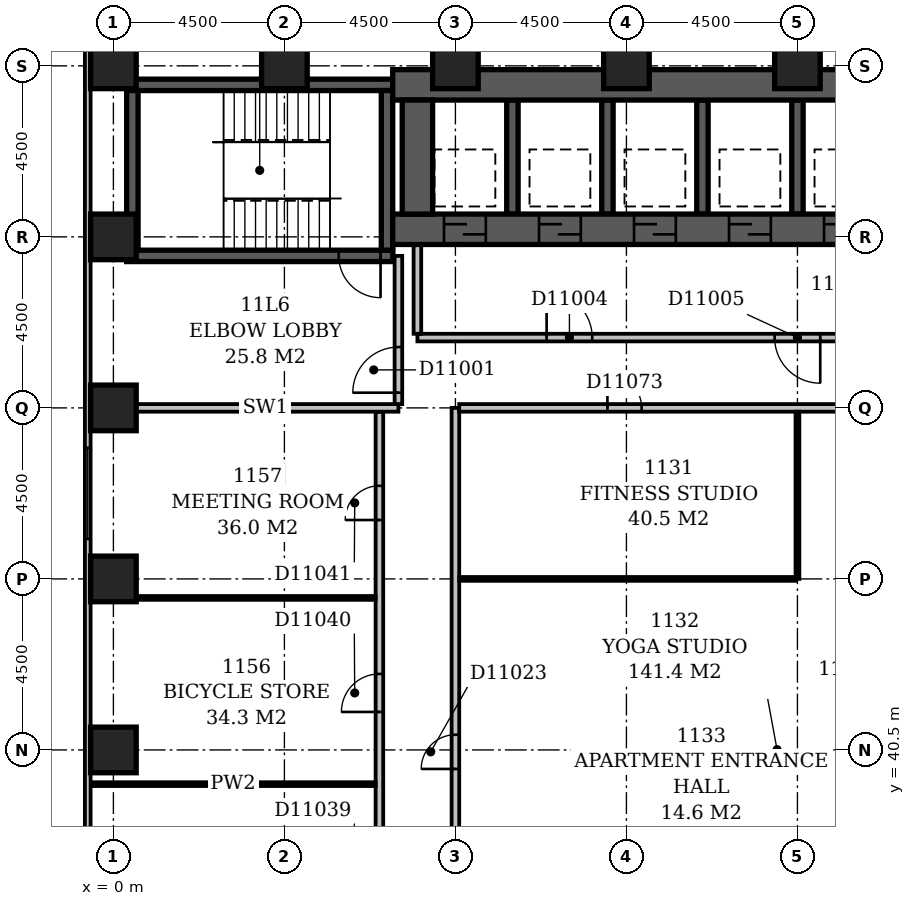
"""IFC4 building model, lengths in metres.
Left out: names, types, materials, properties, quantities, classifications, styles, units other than length and angle.
Written with IfcOpenShell. Run it as: python <this file> out.ifc"""

import sys

from ifc_helpers import new_model, si_unit, direction, frame, frame_2d, origin, origin_2d, place, context, subcontext, project, spatial, rectangle, extrude, element, fill, save


model = new_model("IFC4")
c1 = context("Model", 3, precision=1e-05, world=origin(), true_north=direction((0.0, 1.0)))
c2 = subcontext(c1, "Body", "Model", "MODEL_VIEW")
j1 = project(units=[si_unit("LENGTHUNIT", "METRE"), si_unit("PLANEANGLEUNIT", "RADIAN")], contexts=[c1])
p1 = place(None, origin())
s1 = spatial("IfcSite", under=j1, at=p1, CompositionType="ELEMENT")
p2 = place(p1, origin())
s2 = spatial("IfcBuilding", under=s1, at=p2, CompositionType="ELEMENT")
p3 = place(p2, frame((0.0, 0.0, 50.6)))
s3 = spatial("IfcBuildingStorey", under=s2, at=p3, CompositionType="ELEMENT", Elevation=50.6)
p4 = place(p3, frame((0.35, 53.5, -0.3), z_axis=(0.0, 0.0, 1.0), x_axis=(1.0, 0.0, 0.0)))
e1 = element("IfcWall", 1, at=p4, inside=s3, PredefinedType="SHEAR", context=c2, shape_type="SweptSolid", body=[
    extrude(rectangle(XDim=7.0, YDim=0.3, at=frame_2d((3.5, 0.0))), origin(), (0.0, 0.0, 1.0), 3.6),
])
p5 = place(p4, frame((5.58, 0.0, 0.3)))
e2 = element("IfcOpeningElement", 2, at=p5, cuts=e1, PredefinedType="OPENING", context=c2, shape_type="SweptSolid", body=[
    extrude(rectangle(XDim=1.1, YDim=2.1, at=frame_2d((0.55, 1.05))), frame((0.0, 0.162, 0.0), z_axis=(0.0, -1.0, 0.0), x_axis=(1.0, 0.0, 0.0)), (0.0, 0.0, 1.0), 0.324),
])
p6 = place(p3, frame((0.35, 58.0, -0.3), z_axis=(0.0, 0.0, 1.0), x_axis=(1.0, 0.0, 0.0)))
e3 = element("IfcWall", 3, at=p6, inside=s3, PredefinedType="SHEAR", context=c2, shape_type="SweptSolid", body=[
    extrude(rectangle(XDim=7.0, YDim=0.3, at=frame_2d((3.5, 0.0))), origin(), (0.0, 0.0, 1.0), 3.6),
])
for number, where, z_axis, x_axis in (
    (4, (0.5, 53.65, -0.3), (0.0, 0.0, 1.0), (0.0, 1.0, 0.0)),
    (5, (7.2, 53.65, -0.3), (0.0, 0.0, 1.0), (0.0, 1.0, 0.0)),
):
    element("IfcWall", number, at=place(p3, frame(where, z_axis=z_axis, x_axis=x_axis)), inside=s3, PredefinedType="SHEAR", context=c2, shape_type="SweptSolid", body=[
        extrude(rectangle(XDim=4.2, YDim=0.3, at=frame_2d((2.1, 0.0))), origin(), (0.0, 0.0, 1.0), 3.6),
    ])
p7 = place(p3, frame((7.35, 54.2, -0.3), z_axis=(0.0, 0.0, 1.0), x_axis=(1.0, 0.0, 0.0)))
e6 = element("IfcWall", 6, at=p7, inside=s3, PredefinedType="SHEAR", context=c2, shape_type="SweptSolid", body=[
    extrude(rectangle(XDim=16.45, YDim=0.8, at=frame_2d((8.225, 0.0))), origin(), (0.0, 0.0, 1.0), 3.6),
])
p8 = place(p7, frame((1.35, 0.0, 0.3)))
e7 = element("IfcOpeningElement", 7, at=p8, cuts=e6, PredefinedType="OPENING", context=c2, shape_type="SweptSolid", body=[
    extrude(rectangle(XDim=1.1, YDim=2.1, at=frame_2d((0.55, 1.05))), frame((0.0, 0.412, 0.0), z_axis=(0.0, -1.0, 0.0), x_axis=(1.0, 0.0, 0.0)), (0.0, 0.0, 1.0), 0.824),
])
p9 = place(p7, frame((3.85, 0.0, 0.3)))
e8 = element("IfcOpeningElement", 8, at=p9, cuts=e6, PredefinedType="OPENING", context=c2, shape_type="SweptSolid", body=[
    extrude(rectangle(XDim=1.1, YDim=2.1, at=frame_2d((0.55, 1.05))), frame((0.0, 0.412, 0.0), z_axis=(0.0, -1.0, 0.0), x_axis=(1.0, 0.0, 0.0)), (0.0, 0.0, 1.0), 0.824),
])
p10 = place(p7, frame((6.35, 0.0, 0.3)))
e9 = element("IfcOpeningElement", 9, at=p10, cuts=e6, PredefinedType="OPENING", context=c2, shape_type="SweptSolid", body=[
    extrude(rectangle(XDim=1.1, YDim=2.1, at=frame_2d((0.55, 1.05))), frame((0.0, 0.412, 0.0), z_axis=(0.0, -1.0, 0.0), x_axis=(1.0, 0.0, 0.0)), (0.0, 0.0, 1.0), 0.824),
])
p11 = place(p7, frame((8.85, 0.0, 0.3)))
e10 = element("IfcOpeningElement", 10, at=p11, cuts=e6, PredefinedType="OPENING", context=c2, shape_type="SweptSolid", body=[
    extrude(rectangle(XDim=1.1, YDim=2.1, at=frame_2d((0.55, 1.05))), frame((0.0, 0.412, 0.0), z_axis=(0.0, -1.0, 0.0), x_axis=(1.0, 0.0, 0.0)), (0.0, 0.0, 1.0), 0.824),
])
p12 = place(p7, frame((11.35, 0.0, 0.3)))
e11 = element("IfcOpeningElement", 11, at=p12, cuts=e6, PredefinedType="OPENING", context=c2, shape_type="SweptSolid", body=[
    extrude(rectangle(XDim=1.1, YDim=2.1, at=frame_2d((0.55, 1.05))), frame((0.0, 0.412, 0.0), z_axis=(0.0, -1.0, 0.0), x_axis=(1.0, 0.0, 0.0)), (0.0, 0.0, 1.0), 0.824),
])
p13 = place(p7, frame((13.85, 0.0, 0.3)))
e12 = element("IfcOpeningElement", 12, at=p13, cuts=e6, PredefinedType="OPENING", context=c2, shape_type="SweptSolid", body=[
    extrude(rectangle(XDim=1.1, YDim=2.1, at=frame_2d((0.55, 1.05))), frame((0.0, 0.412, 0.0), z_axis=(0.0, -1.0, 0.0), x_axis=(1.0, 0.0, 0.0)), (0.0, 0.0, 1.0), 0.824),
])
p14 = place(p3, frame((7.35, 58.0, -0.3), z_axis=(0.0, 0.0, 1.0), x_axis=(1.0, 0.0, 0.0)))
e13 = element("IfcWall", 13, at=p14, inside=s3, PredefinedType="SHEAR", context=c2, shape_type="SweptSolid", body=[
    extrude(rectangle(XDim=16.45, YDim=0.8, at=frame_2d((8.225, 0.0))), origin(), (0.0, 0.0, 1.0), 3.6),
])
p15 = place(p3, frame((8.0, 54.6, -0.3), z_axis=(0.0, 0.0, 1.0), x_axis=(0.0, 1.0, 0.0)))
e14 = element("IfcWall", 14, at=p15, inside=s3, PredefinedType="SHEAR", context=c2, shape_type="SweptSolid", body=[
    extrude(rectangle(XDim=3.0, YDim=0.8, at=frame_2d((1.5, 0.0))), origin(), (0.0, 0.0, 1.0), 3.6),
])
for number, where, z_axis, x_axis in (
    (15, (10.5, 54.6, -0.3), (0.0, 0.0, 1.0), (0.0, 1.0, 0.0)),
    (16, (13.0, 54.6, -0.3), (0.0, 0.0, 1.0), (0.0, 1.0, 0.0)),
    (17, (15.5, 54.6, -0.3), (0.0, 0.0, 1.0), (0.0, 1.0, 0.0)),
    (18, (18.0, 54.6, -0.3), (0.0, 0.0, 1.0), (0.0, 1.0, 0.0)),
):
    element("IfcWall", number, at=place(p3, frame(where, z_axis=z_axis, x_axis=x_axis)), inside=s3, PredefinedType="SHEAR", context=c2, shape_type="SweptSolid", body=[
        extrude(rectangle(XDim=3.0, YDim=0.3, at=frame_2d((1.5, 0.0))), origin(), (0.0, 0.0, 1.0), 3.6),
    ])
for number, where, z_axis, x_axis in (
    (19, (0.0, 40.5, -0.3), (0.0, 0.0, 1.0), (1.0, 0.0, 0.0)),
    (20, (0.0, 45.0, -0.3), (0.0, 0.0, 1.0), (1.0, 0.0, 0.0)),
    (21, (0.0, 49.5, -0.3), (0.0, 0.0, 1.0), (1.0, 0.0, 0.0)),
    (22, (0.0, 54.0, -0.3), (0.0, 0.0, 1.0), (1.0, 0.0, 0.0)),
    (23, (0.0, 58.5, -0.3), (0.0, 0.0, 1.0), (1.0, 0.0, 0.0)),
    (24, (4.5, 58.5, -0.3), (0.0, 0.0, 1.0), (1.0, 0.0, 0.0)),
    (25, (9.0, 58.5, -0.3), (0.0, 0.0, 1.0), (1.0, 0.0, 0.0)),
    (26, (13.5, 58.5, -0.3), (0.0, 0.0, 1.0), (1.0, 0.0, 0.0)),
    (27, (18.0, 58.5, -0.3), (0.0, 0.0, 1.0), (1.0, 0.0, 0.0)),
):
    element("IfcColumn", number, at=place(p3, frame(where, z_axis=z_axis, x_axis=x_axis)), inside=s3, PredefinedType="COLUMN", context=c2, shape_type="SweptSolid", body=[
        extrude(rectangle(XDim=1.2, YDim=1.2, at=origin_2d()), origin(), (0.0, 0.0, 1.0), 3.6),
    ])
p16 = place(p3, frame((-0.675, 59.1, 0.0), z_axis=(0.0, 0.0, 1.0), x_axis=(0.0, -1.0, 0.0)))
e28 = element("IfcWall", 28, at=p16, inside=s3, PredefinedType="STANDARD", context=c2, shape_type="SweptSolid", body=[
    extrude(rectangle(XDim=55.35, YDim=0.15, at=frame_2d((27.675, 0.0))), origin(), (0.0, 0.0, 1.0), 2.7),
])
p17 = place(p16, frame((10.65, 0.0, 0.6)))
e29 = element("IfcOpeningElement", 29, at=p17, cuts=e28, PredefinedType="OPENING", context=c2, shape_type="SweptSolid", body=[
    extrude(rectangle(XDim=2.4, YDim=1.8, at=frame_2d((1.2, 0.9))), frame((0.0, 0.087, 0.0), z_axis=(0.0, -1.0, 0.0), x_axis=(1.0, 0.0, 0.0)), (0.0, 0.0, 1.0), 0.174),
])
p18 = place(p16, frame((42.15, 0.0, 0.6)))
e30 = element("IfcOpeningElement", 30, at=p18, cuts=e28, PredefinedType="OPENING", context=c2, shape_type="SweptSolid", body=[
    extrude(rectangle(XDim=2.4, YDim=1.8, at=frame_2d((1.2, 0.9))), frame((0.0, 0.087, 0.0), z_axis=(0.0, -1.0, 0.0), x_axis=(1.0, 0.0, 0.0)), (0.0, 0.0, 1.0), 0.174),
])
p19 = place(p3, frame((8.0, 51.35, 0.0), z_axis=(0.0, 0.0, 1.0), x_axis=(1.0, 0.0, 0.0)))
e31 = element("IfcWall", 31, at=p19, inside=s3, PredefinedType="PARTITIONING", context=c2, shape_type="SweptSolid", body=[
    extrude(rectangle(XDim=15.0, YDim=0.2, at=frame_2d((7.5, 0.0))), origin(), (0.0, 0.0, 1.0), 3.3),
])
p20 = place(p19, frame((3.4, 0.0, 0.0)))
e32 = element("IfcOpeningElement", 32, at=p20, cuts=e31, PredefinedType="OPENING", context=c2, shape_type="SweptSolid", body=[
    extrude(rectangle(XDim=1.2, YDim=2.1, at=frame_2d((0.6, 1.05))), frame((0.0, 0.112, 0.0), z_axis=(0.0, -1.0, 0.0), x_axis=(1.0, 0.0, 0.0)), (0.0, 0.0, 1.0), 0.224),
])
p21 = place(p19, frame((9.4, 0.0, 0.0)))
e33 = element("IfcOpeningElement", 33, at=p21, cuts=e31, PredefinedType="OPENING", context=c2, shape_type="SweptSolid", body=[
    extrude(rectangle(XDim=1.2, YDim=2.1, at=frame_2d((0.6, 1.05))), frame((0.0, 0.112, 0.0), z_axis=(0.0, -1.0, 0.0), x_axis=(1.0, 0.0, 0.0)), (0.0, 0.0, 1.0), 0.224),
])
p22 = place(p3, frame((8.0, 51.45, 0.0), z_axis=(0.0, 0.0, 1.0), x_axis=(0.0, 1.0, 0.0)))
e34 = element("IfcWall", 34, at=p22, inside=s3, PredefinedType="PARTITIONING", context=c2, shape_type="SweptSolid", body=[
    extrude(rectangle(XDim=2.33, YDim=0.2, at=frame_2d((1.165, 0.0))), origin(), (0.0, 0.0, 1.0), 3.3),
])
p23 = place(p3, frame((0.5, 49.5, 0.0), z_axis=(0.0, 0.0, 1.0), x_axis=(1.0, 0.0, 0.0)))
e35 = element("IfcWall", 35, at=p23, inside=s3, PredefinedType="PARTITIONING", context=c2, shape_type="SweptSolid", body=[
    extrude(rectangle(XDim=7.0, YDim=0.2, at=frame_2d((3.5, 0.0))), origin(), (0.0, 0.0, 1.0), 3.3),
])
p24 = place(p3, frame((7.5, 49.6, 0.0), z_axis=(0.0, 0.0, 1.0), x_axis=(0.0, 1.0, 0.0)))
e36 = element("IfcWall", 36, at=p24, inside=s3, PredefinedType="PARTITIONING", context=c2, shape_type="SweptSolid", body=[
    extrude(rectangle(XDim=3.9, YDim=0.2, at=frame_2d((1.95, 0.0))), origin(), (0.0, 0.0, 1.0), 3.3),
])
p25 = place(p24, frame((0.3, 0.0, 0.0)))
e37 = element("IfcOpeningElement", 37, at=p25, cuts=e36, PredefinedType="OPENING", context=c2, shape_type="SweptSolid", body=[
    extrude(rectangle(XDim=1.2, YDim=2.1, at=frame_2d((0.6, 1.05))), frame((0.0, 0.112, 0.0), z_axis=(0.0, -1.0, 0.0), x_axis=(1.0, 0.0, 0.0)), (0.0, 0.0, 1.0), 0.224),
])
p26 = place(p3, frame((9.0, 5.0, 0.0), z_axis=(0.0, 0.0, 1.0), x_axis=(0.0, 1.0, 0.0)))
e38 = element("IfcWall", 38, at=p26, inside=s3, PredefinedType="PARTITIONING", context=c2, shape_type="SweptSolid", body=[
    extrude(rectangle(XDim=44.5, YDim=0.2, at=frame_2d((22.25, 0.0))), origin(), (0.0, 0.0, 1.0), 3.3),
])
p27 = place(p26, frame((28.45, 0.0, 0.0)))
e39 = element("IfcOpeningElement", 39, at=p27, cuts=e38, PredefinedType="OPENING", context=c2, shape_type="SweptSolid", body=[
    extrude(rectangle(XDim=1.0, YDim=2.1, at=frame_2d((0.5, 1.05))), frame((0.0, 0.112, 0.0), z_axis=(0.0, -1.0, 0.0), x_axis=(1.0, 0.0, 0.0)), (0.0, 0.0, 1.0), 0.224),
])
p28 = place(p26, frame((17.8, 0.0, 0.0)))
e40 = element("IfcOpeningElement", 40, at=p28, cuts=e38, PredefinedType="OPENING", context=c2, shape_type="SweptSolid", body=[
    extrude(rectangle(XDim=1.0, YDim=2.1, at=frame_2d((0.5, 1.05))), frame((0.0, 0.112, 0.0), z_axis=(0.0, -1.0, 0.0), x_axis=(1.0, 0.0, 0.0)), (0.0, 0.0, 1.0), 0.224),
])
p29 = place(p26, frame((14.55, 0.0, 0.0)))
e41 = element("IfcOpeningElement", 41, at=p29, cuts=e38, PredefinedType="OPENING", context=c2, shape_type="SweptSolid", body=[
    extrude(rectangle(XDim=1.0, YDim=2.1, at=frame_2d((0.5, 1.05))), frame((0.0, 0.112, 0.0), z_axis=(0.0, -1.0, 0.0), x_axis=(1.0, 0.0, 0.0)), (0.0, 0.0, 1.0), 0.224),
])
p30 = place(p26, frame((11.7, 0.0, 0.0)))
e42 = element("IfcOpeningElement", 42, at=p30, cuts=e38, PredefinedType="OPENING", context=c2, shape_type="SweptSolid", body=[
    extrude(rectangle(XDim=1.0, YDim=2.1, at=frame_2d((0.5, 1.05))), frame((0.0, 0.112, 0.0), z_axis=(0.0, -1.0, 0.0), x_axis=(1.0, 0.0, 0.0)), (0.0, 0.0, 1.0), 0.224),
])
p31 = place(p26, frame((35.0, 0.0, 0.0)))
e43 = element("IfcOpeningElement", 43, at=p31, cuts=e38, PredefinedType="OPENING", context=c2, shape_type="SweptSolid", body=[
    extrude(rectangle(XDim=0.9, YDim=2.1, at=frame_2d((0.45, 1.05))), frame((0.0, 0.112, 0.0), z_axis=(0.0, -1.0, 0.0), x_axis=(1.0, 0.0, 0.0)), (0.0, 0.0, 1.0), 0.224),
])
p32 = place(p26, frame((1.5, 0.0, 0.0)))
e44 = element("IfcOpeningElement", 44, at=p32, cuts=e38, PredefinedType="OPENING", context=c2, shape_type="SweptSolid", body=[
    extrude(rectangle(XDim=0.9, YDim=2.1, at=frame_2d((0.45, 1.05))), frame((0.0, 0.112, 0.0), z_axis=(0.0, -1.0, 0.0), x_axis=(1.0, 0.0, 0.0)), (0.0, 0.0, 1.0), 0.224),
])
p33 = place(p3, frame((7.0, 34.6, 0.0), z_axis=(0.0, 0.0, 1.0), x_axis=(0.0, 1.0, 0.0)))
e45 = element("IfcWall", 45, at=p33, inside=s3, PredefinedType="PARTITIONING", context=c2, shape_type="SweptSolid", body=[
    extrude(rectangle(XDim=14.8, YDim=0.2, at=frame_2d((7.4, 0.0))), origin(), (0.0, 0.0, 1.0), 3.3),
])
p34 = place(p33, frame((1.9, 0.0, 0.0)))
e46 = element("IfcOpeningElement", 46, at=p34, cuts=e45, PredefinedType="OPENING", context=c2, shape_type="SweptSolid", body=[
    extrude(rectangle(XDim=1.0, YDim=2.1, at=frame_2d((0.5, 1.05))), frame((0.0, 0.112, 0.0), z_axis=(0.0, -1.0, 0.0), x_axis=(1.0, 0.0, 0.0)), (0.0, 0.0, 1.0), 0.224),
])
p35 = place(p33, frame((6.9, 0.0, 0.0)))
e47 = element("IfcOpeningElement", 47, at=p35, cuts=e45, PredefinedType="OPENING", context=c2, shape_type="SweptSolid", body=[
    extrude(rectangle(XDim=1.0, YDim=2.1, at=frame_2d((0.5, 1.05))), frame((0.0, 0.112, 0.0), z_axis=(0.0, -1.0, 0.0), x_axis=(1.0, 0.0, 0.0)), (0.0, 0.0, 1.0), 0.224),
])
p36 = place(p33, frame((11.95, 0.0, 0.0)))
e48 = element("IfcOpeningElement", 48, at=p36, cuts=e45, PredefinedType="OPENING", context=c2, shape_type="SweptSolid", body=[
    extrude(rectangle(XDim=0.9, YDim=2.1, at=frame_2d((0.45, 1.05))), frame((0.0, 0.112, 0.0), z_axis=(0.0, -1.0, 0.0), x_axis=(1.0, 0.0, 0.0)), (0.0, 0.0, 1.0), 0.224),
])
p37 = place(p3, frame((-0.6, 39.6, 0.0), z_axis=(0.0, 0.0, 1.0), x_axis=(1.0, 0.0, 0.0)))
e49 = element("IfcWall", 49, at=p37, inside=s3, PredefinedType="PARTITIONING", context=c2, shape_type="SweptSolid", body=[
    extrude(rectangle(XDim=7.5, YDim=0.1, at=frame_2d((3.75, 0.0))), origin(), (0.0, 0.0, 1.0), 3.3),
])
p38 = place(p3, frame((0.6, 44.5, 0.0), z_axis=(0.0, 0.0, 1.0), x_axis=(1.0, 0.0, 0.0)))
e50 = element("IfcWall", 50, at=p38, inside=s3, PredefinedType="PARTITIONING", context=c2, shape_type="SweptSolid", body=[
    extrude(rectangle(XDim=6.3, YDim=0.1, at=frame_2d((3.15, 0.0))), origin(), (0.0, 0.0, 1.0), 3.3),
])
p39 = place(p3, frame((9.1, 45.0, 0.0), z_axis=(0.0, 0.0, 1.0), x_axis=(1.0, 0.0, 0.0)))
e51 = element("IfcWall", 51, at=p39, inside=s3, PredefinedType="PARTITIONING", context=c2, shape_type="SweptSolid", body=[
    extrude(rectangle(XDim=8.85, YDim=0.1, at=frame_2d((4.425, 0.0))), origin(), (0.0, 0.0, 1.0), 3.3),
])
p40 = place(p3, frame((18.0, 45.0, 0.0), z_axis=(0.0, 0.0, 1.0), x_axis=(0.0, 1.0, 0.0)))
e52 = element("IfcWall", 52, at=p40, inside=s3, PredefinedType="PARTITIONING", context=c2, shape_type="SweptSolid", body=[
    extrude(rectangle(XDim=4.4, YDim=0.1, at=frame_2d((2.2, 0.0))), origin(), (0.0, 0.0, 1.0), 3.3),
])
p41 = place(p3, frame((9.1, 49.5, 0.0), z_axis=(0.0, 0.0, 1.0), x_axis=(1.0, 0.0, 0.0)))
e53 = element("IfcWall", 53, at=p41, inside=s3, PredefinedType="PARTITIONING", context=c2, shape_type="SweptSolid", body=[
    extrude(rectangle(XDim=57.8, YDim=0.2, at=frame_2d((28.9, 0.0))), origin(), (0.0, 0.0, 1.0), 3.3),
])
p42 = place(p41, frame((16.1, 0.0, 0.0)))
e54 = element("IfcOpeningElement", 54, at=p42, cuts=e53, PredefinedType="OPENING", context=c2, shape_type="SweptSolid", body=[
    extrude(rectangle(XDim=1.0, YDim=2.1, at=frame_2d((0.5, 1.05))), frame((0.0, 0.112, 0.0), z_axis=(0.0, -1.0, 0.0), x_axis=(1.0, 0.0, 0.0)), (0.0, 0.0, 1.0), 0.224),
])
p43 = place(p41, frame((40.0, 0.0, 0.0)))
e55 = element("IfcOpeningElement", 55, at=p43, cuts=e53, PredefinedType="OPENING", context=c2, shape_type="SweptSolid", body=[
    extrude(rectangle(XDim=1.0, YDim=2.1, at=frame_2d((0.5, 1.05))), frame((0.0, 0.112, 0.0), z_axis=(0.0, -1.0, 0.0), x_axis=(1.0, 0.0, 0.0)), (0.0, 0.0, 1.0), 0.224),
])
p44 = place(p41, frame((45.2, 0.0, 0.0)))
e56 = element("IfcOpeningElement", 56, at=p44, cuts=e53, PredefinedType="OPENING", context=c2, shape_type="SweptSolid", body=[
    extrude(rectangle(XDim=1.0, YDim=2.1, at=frame_2d((0.5, 1.05))), frame((0.0, 0.112, 0.0), z_axis=(0.0, -1.0, 0.0), x_axis=(1.0, 0.0, 0.0)), (0.0, 0.0, 1.0), 0.224),
])
p45 = place(p41, frame((3.9, 0.0, 0.0)))
e57 = element("IfcOpeningElement", 57, at=p45, cuts=e53, PredefinedType="OPENING", context=c2, shape_type="SweptSolid", body=[
    extrude(rectangle(XDim=0.9, YDim=2.1, at=frame_2d((0.45, 1.05))), frame((0.0, 0.112, 0.0), z_axis=(0.0, -1.0, 0.0), x_axis=(1.0, 0.0, 0.0)), (0.0, 0.0, 1.0), 0.224),
])
p46 = place(p17, origin())
e58 = element("IfcWindow", 58, at=p46, inside=s3, PartitioningType="SINGLE_PANEL", PredefinedType="WINDOW", context=c2, shape_type="SweptSolid", body=[
    extrude(rectangle(XDim=2.4, YDim=1.8, at=frame_2d((1.2, 0.9))), frame((0.0, 0.03, 0.0), z_axis=(0.0, -1.0, 0.0), x_axis=(1.0, 0.0, 0.0)), (0.0, 0.0, 1.0), 0.06),
])
fill(e29, e58)
p47 = place(p25, origin())
e59 = element("IfcDoor", 59, at=p47, inside=s3, OperationType="SINGLE_SWING_LEFT", PredefinedType="DOOR", context=c2, shape_type="SweptSolid", body=[
    extrude(rectangle(XDim=1.2, YDim=2.1, at=frame_2d((0.6, 1.05))), frame((0.0, 0.025, 0.0), z_axis=(0.0, -1.0, 0.0), x_axis=(1.0, 0.0, 0.0)), (0.0, 0.0, 1.0), 0.05),
])
fill(e37, e59)
p48 = place(p8, origin())
e60 = element("IfcDoor", 60, at=p48, inside=s3, OperationType="SLIDING_TO_LEFT", PredefinedType="DOOR", context=c2, shape_type="SweptSolid", body=[
    extrude(rectangle(XDim=1.1, YDim=2.1, at=frame_2d((0.55, 1.05))), frame((0.0, 0.025, 0.0), z_axis=(0.0, -1.0, 0.0), x_axis=(1.0, 0.0, 0.0)), (0.0, 0.0, 1.0), 0.05),
])
fill(e7, e60)
p49 = place(p9, origin())
e61 = element("IfcDoor", 61, at=p49, inside=s3, OperationType="SLIDING_TO_LEFT", PredefinedType="DOOR", context=c2, shape_type="SweptSolid", body=[
    extrude(rectangle(XDim=1.1, YDim=2.1, at=frame_2d((0.55, 1.05))), frame((0.0, 0.025, 0.0), z_axis=(0.0, -1.0, 0.0), x_axis=(1.0, 0.0, 0.0)), (0.0, 0.0, 1.0), 0.05),
])
fill(e8, e61)
p50 = place(p10, origin())
e62 = element("IfcDoor", 62, at=p50, inside=s3, OperationType="SLIDING_TO_LEFT", PredefinedType="DOOR", context=c2, shape_type="SweptSolid", body=[
    extrude(rectangle(XDim=1.1, YDim=2.1, at=frame_2d((0.55, 1.05))), frame((0.0, 0.025, 0.0), z_axis=(0.0, -1.0, 0.0), x_axis=(1.0, 0.0, 0.0)), (0.0, 0.0, 1.0), 0.05),
])
fill(e9, e62)
p51 = place(p11, origin())
e63 = element("IfcDoor", 63, at=p51, inside=s3, OperationType="SLIDING_TO_LEFT", PredefinedType="DOOR", context=c2, shape_type="SweptSolid", body=[
    extrude(rectangle(XDim=1.1, YDim=2.1, at=frame_2d((0.55, 1.05))), frame((0.0, 0.025, 0.0), z_axis=(0.0, -1.0, 0.0), x_axis=(1.0, 0.0, 0.0)), (0.0, 0.0, 1.0), 0.05),
])
fill(e10, e63)
p52 = place(p12, origin())
e64 = element("IfcDoor", 64, at=p52, inside=s3, OperationType="SLIDING_TO_LEFT", PredefinedType="DOOR", context=c2, shape_type="SweptSolid", body=[
    extrude(rectangle(XDim=1.1, YDim=2.1, at=frame_2d((0.55, 1.05))), frame((0.0, 0.025, 0.0), z_axis=(0.0, -1.0, 0.0), x_axis=(1.0, 0.0, 0.0)), (0.0, 0.0, 1.0), 0.05),
])
fill(e11, e64)
p53 = place(p20, origin())
e65 = element("IfcDoor", 65, at=p53, inside=s3, OperationType="SINGLE_SWING_LEFT", PredefinedType="DOOR", context=c2, shape_type="SweptSolid", body=[
    extrude(rectangle(XDim=1.2, YDim=2.1, at=frame_2d((0.6, 1.05))), frame((0.0, 0.025, 0.0), z_axis=(0.0, -1.0, 0.0), x_axis=(1.0, 0.0, 0.0)), (0.0, 0.0, 1.0), 0.05),
])
fill(e32, e65)
p54 = place(p21, origin())
e66 = element("IfcDoor", 66, at=p54, inside=s3, OperationType="SINGLE_SWING_RIGHT", PredefinedType="DOOR", context=c2, shape_type="SweptSolid", body=[
    extrude(rectangle(XDim=1.2, YDim=2.1, at=frame_2d((0.6, 1.05))), frame((0.0, 0.025, 0.0), z_axis=(0.0, -1.0, 0.0), x_axis=(1.0, 0.0, 0.0)), (0.0, 0.0, 1.0), 0.05),
])
fill(e33, e66)
p55 = place(p5, origin())
e67 = element("IfcDoor", 67, at=p55, inside=s3, OperationType="SINGLE_SWING_RIGHT", PredefinedType="DOOR", context=c2, shape_type="SweptSolid", body=[
    extrude(rectangle(XDim=1.1, YDim=2.1, at=frame_2d((0.55, 1.05))), frame((0.0, 0.025, 0.0), z_axis=(0.0, -1.0, 0.0), x_axis=(1.0, 0.0, 0.0)), (0.0, 0.0, 1.0), 0.05),
])
fill(e2, e67)
p56 = place(p31, origin())
e68 = element("IfcDoor", 68, at=p56, inside=s3, OperationType="SINGLE_SWING_LEFT", PredefinedType="DOOR", context=c2, shape_type="SweptSolid", body=[
    extrude(rectangle(XDim=0.9, YDim=2.1, at=frame_2d((0.45, 1.05))), frame((0.0, 0.025, 0.0), z_axis=(0.0, -1.0, 0.0), x_axis=(1.0, 0.0, 0.0)), (0.0, 0.0, 1.0), 0.05),
])
fill(e43, e68)
p57 = place(p35, origin())
e69 = element("IfcDoor", 69, at=p57, inside=s3, OperationType="SINGLE_SWING_LEFT", PredefinedType="DOOR", context=c2, shape_type="SweptSolid", body=[
    extrude(rectangle(XDim=1.0, YDim=2.1, at=frame_2d((0.5, 1.05))), frame((0.0, 0.025, 0.0), z_axis=(0.0, -1.0, 0.0), x_axis=(1.0, 0.0, 0.0)), (0.0, 0.0, 1.0), 0.05),
])
fill(e47, e69)
p58 = place(p36, origin())
e70 = element("IfcDoor", 70, at=p58, inside=s3, OperationType="SINGLE_SWING_LEFT", PredefinedType="DOOR", context=c2, shape_type="SweptSolid", body=[
    extrude(rectangle(XDim=0.9, YDim=2.1, at=frame_2d((0.45, 1.05))), frame((0.0, 0.025, 0.0), z_axis=(0.0, -1.0, 0.0), x_axis=(1.0, 0.0, 0.0)), (0.0, 0.0, 1.0), 0.05),
])
fill(e48, e70)
p59 = place(p45, origin())
e71 = element("IfcDoor", 71, at=p59, inside=s3, OperationType="SINGLE_SWING_LEFT", PredefinedType="DOOR", context=c2, shape_type="SweptSolid", body=[
    extrude(rectangle(XDim=0.9, YDim=2.1, at=frame_2d((0.45, 1.05))), frame((0.0, 0.025, 0.0), z_axis=(0.0, -1.0, 0.0), x_axis=(1.0, 0.0, 0.0)), (0.0, 0.0, 1.0), 0.05),
])
fill(e57, e71)
save(model, sys.argv[1])
